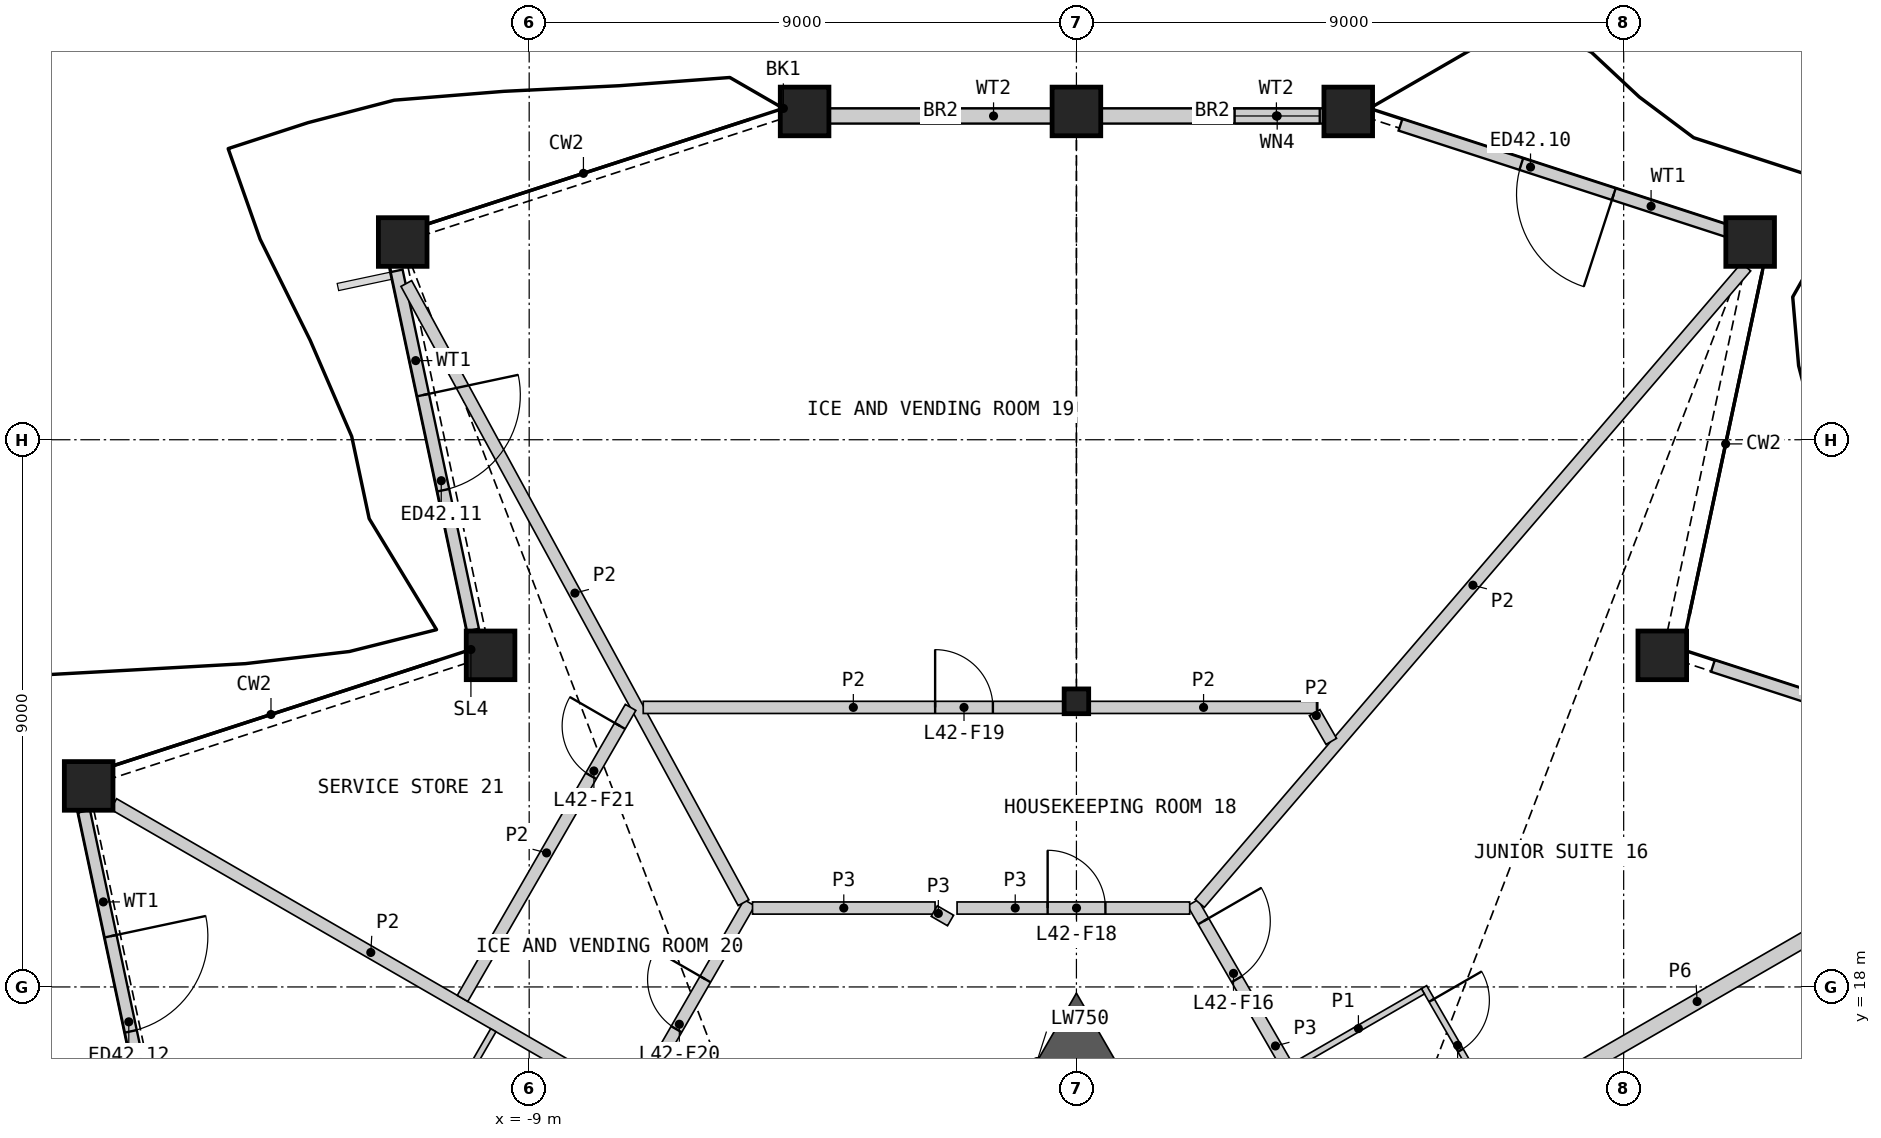
"""IFC4 building model, lengths in metres.
Left out: names, types, materials, properties, quantities, classifications, styles, units other than length and angle.
Written with IfcOpenShell. Run it as: python <this file> out.ifc"""

import sys

from ifc_helpers import new_model, si_unit, direction, frame, frame_2d, origin, origin_2d, place, context, subcontext, project, spatial, polyline, rectangle, hollow_rectangle, i_section, outline, extrude, element, fill, save


model = new_model("IFC4")
c1 = context("Model", 3, precision=1e-05, world=origin(), true_north=direction((0.0, 1.0)))
c2 = subcontext(c1, "Body", "Model", "MODEL_VIEW")
j1 = project(units=[si_unit("LENGTHUNIT", "METRE"), si_unit("PLANEANGLEUNIT", "RADIAN")], contexts=[c1])
p1 = place(None, origin())
s1 = spatial("IfcSite", under=j1, at=p1, CompositionType="ELEMENT")
p2 = place(p1, origin())
s2 = spatial("IfcBuilding", under=s1, at=p2, CompositionType="ELEMENT")
p3 = place(p2, frame((0.0, 0.0, 194.4)))
s3 = spatial("IfcBuildingStorey", under=s2, at=p3, CompositionType="ELEMENT", Elevation=194.4)
for number, where, z_axis, x_axis in (
    (1, (9.635, 23.454, 0.0), (0.0, 0.0, 1.0), (1.0, 0.0, 0.0)),
    (2, (11.08, 30.252, 0.0), (0.0, 0.0, 1.0), (1.0, 0.0, 0.0)),
    (3, (4.47, 32.399, 0.0), (0.0, 0.0, 1.0), (1.0, 0.0, 0.0)),
    (4, (0.0, 32.399, 0.0), (0.0, 0.0, 1.0), (1.0, 0.0, 0.0)),
    (5, (-4.47, 32.399, 0.0), (0.0, 0.0, 1.0), (1.0, 0.0, 0.0)),
    (6, (-11.08, 30.252, 0.0), (0.0, 0.0, 1.0), (1.0, 0.0, 0.0)),
    (7, (-9.635, 23.454, 0.0), (0.0, 0.0, 1.0), (1.0, 0.0, 0.0)),
    (8, (-16.245, 21.306, 0.0), (0.0, 0.0, 1.0), (1.0, 0.0, 0.0)),
):
    element("IfcColumn", number, at=place(p3, frame(where, z_axis=z_axis, x_axis=x_axis)), inside=s3, PredefinedType="COLUMN", context=c2, shape_type="SweptSolid", body=[
        extrude(hollow_rectangle(XDim=0.8, YDim=0.8, WallThickness=0.05, at=origin_2d()), origin(), (0.0, 0.0, 1.0), 3.6),
    ])
p4 = place(p3, frame((0.0, 22.698, 0.0), z_axis=(0.0, 0.0, 1.0), x_axis=(1.0, 0.0, 0.0)))
e9 = element("IfcColumn", 9, at=p4, inside=s3, PredefinedType="COLUMN", context=c2, shape_type="SweptSolid", body=[
    extrude(i_section(OverallWidth=0.404, OverallDepth=0.407, WebThickness=0.027, FlangeThickness=0.044, at=origin_2d()), origin(), (0.0, 0.0, 1.0), 3.6),
])
p5 = place(p3, frame((15.963, 21.493, 0.0), z_axis=(0.0, 0.0, 1.0), x_axis=(-0.951059834965, 0.309006780371, 0.0)))
e10 = element("IfcWall", 10, at=p5, inside=s3, PredefinedType="SOLIDWALL", context=c2, shape_type="SweptSolid", body=[
    extrude(rectangle(XDim=5.779, YDim=0.2, at=frame_2d((2.889, 0.0))), origin(), (0.0, 0.0, 1.0), 2.701),
])
p6 = place(p5, frame((2.089, 0.0, 0.0)))
e11 = element("IfcOpeningElement", 11, at=p6, cuts=e10, PredefinedType="OPENING", context=c2, shape_type="SweptSolid", body=[
    extrude(rectangle(XDim=1.6, YDim=2.4, at=frame_2d((0.8, 1.2))), frame((0.0, 0.11, 0.0), z_axis=(0.0, -1.0, 0.0), x_axis=(1.0, 0.0, 0.0)), (0.0, 0.0, 1.0), 0.22),
])
p7 = place(p3, frame((10.825, 30.394, 0.0), z_axis=(0.0, 0.0, 1.0), x_axis=(-0.9510558006, 0.30901919705, 0.0)))
e12 = element("IfcWall", 12, at=p7, inside=s3, PredefinedType="SOLIDWALL", context=c2, shape_type="SweptSolid", body=[
    extrude(rectangle(XDim=5.778, YDim=0.2, at=frame_2d((2.889, 0.0))), origin(), (0.0, 0.0, 1.0), 2.701),
])
p8 = place(p7, frame((2.089, 0.0, 0.0)))
e13 = element("IfcOpeningElement", 13, at=p8, cuts=e12, PredefinedType="OPENING", context=c2, shape_type="SweptSolid", body=[
    extrude(rectangle(XDim=1.6, YDim=2.4, at=frame_2d((0.8, 1.2))), frame((0.0, 0.11, 0.0), z_axis=(0.0, -1.0, 0.0), x_axis=(1.0, 0.0, 0.0)), (0.0, 0.0, 1.0), 0.22),
])
p9 = place(p3, frame((4.252, 32.325, 0.0), z_axis=(0.0, 0.0, 1.0), x_axis=(-1.0, 0.0, 0.0)))
e14 = element("IfcWall", 14, at=p9, inside=s3, PredefinedType="SOLIDWALL", context=c2, shape_type="SweptSolid", body=[
    extrude(rectangle(XDim=3.852, YDim=0.25, at=frame_2d((1.926, 0.0))), origin(), (0.0, 0.0, 1.0), 2.701),
])
p10 = place(p9, frame((0.25, 0.0, 0.4)))
e15 = element("IfcOpeningElement", 15, at=p10, cuts=e14, PredefinedType="OPENING", context=c2, shape_type="SweptSolid", body=[
    extrude(rectangle(XDim=1.4, YDim=0.7, at=frame_2d((0.7, 0.35))), frame((0.0, 0.135, 0.0), z_axis=(0.0, -1.0, 0.0), x_axis=(1.0, 0.0, 0.0)), (0.0, 0.0, 1.0), 0.27),
])
p11 = place(p3, frame((-0.4, 32.325, 0.0), z_axis=(0.0, 0.0, 1.0), x_axis=(-1.0, 0.0, 0.0)))
e16 = element("IfcWall", 16, at=p11, inside=s3, PredefinedType="SOLIDWALL", context=c2, shape_type="SweptSolid", body=[
    extrude(rectangle(XDim=3.852, YDim=0.25, at=frame_2d((1.926, 0.0))), origin(), (0.0, 0.0, 1.0), 2.701),
])
p12 = place(p3, frame((-11.18, 29.778, 0.0), z_axis=(0.0, 0.0, 1.0), x_axis=(0.207894531291, -0.978151247946, 0.0)))
e17 = element("IfcWall", 17, at=p12, inside=s3, PredefinedType="SOLIDWALL", context=c2, shape_type="SweptSolid", body=[
    extrude(rectangle(XDim=6.04, YDim=0.2, at=frame_2d((3.02, 0.0))), origin(), (0.0, 0.0, 1.0), 2.701),
])
p13 = place(p12, frame((2.089, 0.0, 0.0)))
e18 = element("IfcOpeningElement", 18, at=p13, cuts=e17, PredefinedType="OPENING", context=c2, shape_type="SweptSolid", body=[
    extrude(rectangle(XDim=1.6, YDim=2.4, at=frame_2d((0.8, 1.2))), frame((0.0, 0.11, 0.0), z_axis=(0.0, -1.0, 0.0), x_axis=(1.0, 0.0, 0.0)), (0.0, 0.0, 1.0), 0.22),
])
p14 = place(p3, frame((-16.321, 20.89, 0.0), z_axis=(0.0, 0.0, 1.0), x_axis=(0.207912864597, -0.978147351238, 0.0)))
e19 = element("IfcWall", 19, at=p14, inside=s3, PredefinedType="SOLIDWALL", context=c2, shape_type="SweptSolid", body=[
    extrude(rectangle(XDim=6.098, YDim=0.2, at=frame_2d((3.049, 0.0))), origin(), (0.0, 0.0, 1.0), 2.701),
])
p15 = place(p14, frame((2.101, 0.0, 0.0)))
e20 = element("IfcOpeningElement", 20, at=p15, cuts=e19, PredefinedType="OPENING", context=c2, shape_type="SweptSolid", body=[
    extrude(rectangle(XDim=1.6, YDim=2.4, at=frame_2d((0.8, 1.2))), frame((0.0, 0.11, 0.0), z_axis=(0.0, -1.0, 0.0), x_axis=(1.0, 0.0, 0.0)), (0.0, 0.0, 1.0), 0.22),
])
p16 = place(p3, origin())
e21 = element("IfcWall", 21, at=p16, inside=s3, PredefinedType="SHEAR", context=c2, shape_type="SweptSolid", body=[
    extrude(outline(polyline([(-0.649, 16.773), (0.0, 17.898), (0.649, 16.773), (0.0, 16.398), (-0.649, 16.773)])), origin(), (0.0, 0.0, 1.0), 3.25),
])
p17 = place(p3, frame((-19.476, -5.035, 0.0), z_axis=(0.0, 0.0, 1.0), x_axis=(0.500000757641, 0.86602496636, 0.0)))
e22 = element("IfcWall", 22, at=p17, inside=s3, PredefinedType="PARTITIONING", context=c2, shape_type="SweptSolid", body=[
    extrude(rectangle(XDim=28.198, YDim=0.2, at=frame_2d((14.099, 0.0))), origin(), (0.0, 0.0, 1.0), 3.25),
])
p18 = place(p17, frame((25.796, 0.0, 0.0)))
e23 = element("IfcOpeningElement", 23, at=p18, cuts=e22, PredefinedType="OPENING", context=c2, shape_type="SweptSolid", body=[
    extrude(rectangle(XDim=0.95, YDim=2.1, at=frame_2d((0.475, 1.05))), frame((0.0, 0.11, 0.0), z_axis=(0.0, -1.0, 0.0), x_axis=(1.0, 0.0, 0.0)), (0.0, 0.0, 1.0), 0.22),
])
p19 = place(p17, frame((14.603, 0.0, 0.0)))
e24 = element("IfcOpeningElement", 24, at=p19, cuts=e22, PredefinedType="OPENING", context=c2, shape_type="SweptSolid", body=[
    extrude(rectangle(XDim=1.1, YDim=2.1, at=frame_2d((0.55, 1.05))), frame((0.0, 0.11, 0.0), z_axis=(0.0, -1.0, 0.0), x_axis=(1.0, 0.0, 0.0)), (0.0, 0.0, 1.0), 0.22),
])
p20 = place(p17, frame((11.993, 0.0, 0.0)))
e25 = element("IfcOpeningElement", 25, at=p20, cuts=e22, PredefinedType="OPENING", context=c2, shape_type="SweptSolid", body=[
    extrude(rectangle(XDim=1.1, YDim=2.1, at=frame_2d((0.55, 1.05))), frame((0.0, 0.11, 0.0), z_axis=(0.0, -1.0, 0.0), x_axis=(1.0, 0.0, 0.0)), (0.0, 0.0, 1.0), 0.22),
])
p21 = place(p17, frame((1.452, 0.0, 0.0)))
e26 = element("IfcOpeningElement", 26, at=p21, cuts=e22, PredefinedType="OPENING", context=c2, shape_type="SweptSolid", body=[
    extrude(rectangle(XDim=0.95, YDim=2.1, at=frame_2d((0.475, 1.05))), frame((0.0, 0.11, 0.0), z_axis=(0.0, -1.0, 0.0), x_axis=(1.0, 0.0, 0.0)), (0.0, 0.0, 1.0), 0.22),
])
p22 = place(p3, frame((4.582, 14.512, 0.0), z_axis=(0.0, 0.0, 1.0), x_axis=(0.866027263711, 0.4999967785, 0.0)))
e27 = element("IfcWall", 27, at=p22, inside=s3, PredefinedType="PARTITIONING", context=c2, shape_type="SweptSolid", body=[
    extrude(rectangle(XDim=12.994, YDim=0.25, at=frame_2d((6.497, 0.0))), origin(), (0.0, 0.0, 1.0), 2.404),
])
p23 = place(p3, frame((1.913, 19.385, 0.0), z_axis=(0.0, 0.0, 1.0), x_axis=(0.499972435384, -0.866041317638, 0.0)))
e28 = element("IfcWall", 28, at=p23, inside=s3, PredefinedType="PARTITIONING", context=c2, shape_type="SweptSolid", body=[
    extrude(rectangle(XDim=5.439, YDim=0.2, at=frame_2d((2.719, 0.0))), origin(), (0.0, 0.0, 1.0), 3.25),
])
p24 = place(p23, frame((0.351, 0.0, 0.0)))
e29 = element("IfcOpeningElement", 29, at=p24, cuts=e28, PredefinedType="OPENING", context=c2, shape_type="SweptSolid", body=[
    extrude(rectangle(XDim=1.1, YDim=2.1, at=frame_2d((0.55, 1.05))), frame((0.0, 0.11, 0.0), z_axis=(0.0, -1.0, 0.0), x_axis=(1.0, 0.0, 0.0)), (0.0, 0.0, 1.0), 0.22),
])
p25 = place(p3, frame((-1.963, 19.298, 0.0), z_axis=(0.0, 0.0, 1.0), x_axis=(1.0, 0.0, 0.0)))
e30 = element("IfcWall", 30, at=p25, inside=s3, PredefinedType="PARTITIONING", context=c2, shape_type="SweptSolid", body=[
    extrude(rectangle(XDim=3.826, YDim=0.2, at=frame_2d((1.913, 0.0))), origin(), (0.0, 0.0, 1.0), 3.25),
])
p26 = place(p25, frame((1.49, 0.0, 0.0)))
e31 = element("IfcOpeningElement", 31, at=p26, cuts=e30, PredefinedType="OPENING", context=c2, shape_type="SweptSolid", body=[
    extrude(rectangle(XDim=0.95, YDim=2.1, at=frame_2d((0.475, 1.05))), frame((0.0, 0.11, 0.0), z_axis=(0.0, -1.0, 0.0), x_axis=(1.0, 0.0, 0.0)), (0.0, 0.0, 1.0), 0.22),
])
p27 = place(p3, frame((-5.327, 19.298, 0.0), z_axis=(0.0, 0.0, 1.0), x_axis=(1.0, 0.0, 0.0)))
e32 = element("IfcWall", 32, at=p27, inside=s3, PredefinedType="PARTITIONING", context=c2, shape_type="SweptSolid", body=[
    extrude(rectangle(XDim=3.002, YDim=0.2, at=frame_2d((1.501, 0.0))), origin(), (0.0, 0.0, 1.0), 3.25),
])
p28 = place(p3, frame((-2.338, 19.248, 0.0), z_axis=(0.0, 0.0, 1.0), x_axis=(0.866395311824, -0.499358752451, 0.0)))
e33 = element("IfcWall", 33, at=p28, inside=s3, PredefinedType="PARTITIONING", context=c2, shape_type="SweptSolid", body=[
    extrude(rectangle(XDim=0.31, YDim=0.2, at=frame_2d((0.155, 0.0))), origin(), (0.0, 0.0, 1.0), 3.25),
])
p29 = place(p3, frame((2.028, 19.374, 0.0), z_axis=(0.0, 0.0, 1.0), x_axis=(0.651304244859, 0.758816697647, 0.0)))
e34 = element("IfcWall", 34, at=p29, inside=s3, PredefinedType="PARTITIONING", context=c2, shape_type="SweptSolid", body=[
    extrude(rectangle(XDim=13.795, YDim=0.2, at=frame_2d((6.897, 0.0))), origin(), (0.0, 0.0, 1.0), 2.404),
])
p30 = place(p3, frame((-11.021, 29.57, 0.0), z_axis=(0.0, 0.0, 1.0), x_axis=(0.478233946204, -0.878232482147, 0.0)))
e35 = element("IfcWall", 35, at=p30, inside=s3, PredefinedType="PARTITIONING", context=c2, shape_type="SweptSolid", body=[
    extrude(rectangle(XDim=11.596, YDim=0.2, at=frame_2d((5.798, 0.0))), origin(), (0.0, 0.0, 1.0), 2.404),
])
p31 = place(p3, frame((-15.835, 21.009, 0.0), z_axis=(0.0, 0.0, 1.0), x_axis=(0.866024525919, -0.500001520505, 0.0)))
e36 = element("IfcWall", 36, at=p31, inside=s3, PredefinedType="PARTITIONING", context=c2, shape_type="SweptSolid", body=[
    extrude(rectangle(XDim=9.769, YDim=0.2, at=frame_2d((4.885, 0.0))), origin(), (0.0, 0.0, 1.0), 2.404),
])
p32 = place(p3, frame((-7.124, 22.598, 0.0), z_axis=(0.0, 0.0, 1.0), x_axis=(1.0, 0.0, 0.0)))
e37 = element("IfcWall", 37, at=p32, inside=s3, PredefinedType="PARTITIONING", context=c2, shape_type="SweptSolid", body=[
    extrude(rectangle(XDim=6.911, YDim=0.2, at=frame_2d((3.455, 0.0))), origin(), (0.0, 0.0, 1.0), 2.404),
])
p33 = place(p32, frame((4.801, 0.0, 0.0)))
e38 = element("IfcOpeningElement", 38, at=p33, cuts=e37, PredefinedType="OPENING", context=c2, shape_type="SweptSolid", body=[
    extrude(rectangle(XDim=0.95, YDim=2.1, at=frame_2d((0.475, 1.05))), frame((0.0, 0.11, 0.0), z_axis=(0.0, -1.0, 0.0), x_axis=(1.0, 0.0, 0.0)), (0.0, 0.0, 1.0), 0.22),
])
p34 = place(p3, frame((-10.096, 17.811, 0.0), z_axis=(0.0, 0.0, 1.0), x_axis=(0.500015590807, 0.866016402241, 0.0)))
e39 = element("IfcWall", 39, at=p34, inside=s3, PredefinedType="PARTITIONING", context=c2, shape_type="SweptSolid", body=[
    extrude(rectangle(XDim=5.527, YDim=0.2, at=frame_2d((2.764, 0.0))), origin(), (0.0, 0.0, 1.0), 2.404),
])
p35 = place(p34, frame((4.225, 0.0, 0.0)))
e40 = element("IfcOpeningElement", 40, at=p35, cuts=e39, PredefinedType="OPENING", context=c2, shape_type="SweptSolid", body=[
    extrude(rectangle(XDim=0.95, YDim=2.1, at=frame_2d((0.475, 1.05))), frame((0.0, 0.11, 0.0), z_axis=(0.0, -1.0, 0.0), x_axis=(1.0, 0.0, 0.0)), (0.0, 0.0, 1.0), 0.22),
])
p36 = place(p3, frame((0.214, 22.598, 0.0), z_axis=(0.0, 0.0, 1.0), x_axis=(1.0, 0.0, 0.0)))
e41 = element("IfcWall", 41, at=p36, inside=s3, PredefinedType="PARTITIONING", context=c2, shape_type="SweptSolid", body=[
    extrude(rectangle(XDim=3.755, YDim=0.2, at=frame_2d((1.877, 0.0))), origin(), (0.0, 0.0, 1.0), 2.404),
])
p37 = place(p3, frame((3.918, 22.511, 0.0), z_axis=(0.0, 0.0, 1.0), x_axis=(0.500083826171, -0.865977001312, 0.0)))
e42 = element("IfcWall", 42, at=p37, inside=s3, PredefinedType="PARTITIONING", context=c2, shape_type="SweptSolid", body=[
    extrude(rectangle(XDim=0.546, YDim=0.2, at=frame_2d((0.273, 0.0))), origin(), (0.0, 0.0, 1.0), 2.404),
])
p38 = place(p3, frame((5.717, 17.996, 0.0), z_axis=(0.0, 0.0, 1.0), x_axis=(0.500027264788, -0.866009661879, 0.0)))
e43 = element("IfcWall", 43, at=p38, inside=s3, PredefinedType="PARTITIONING", context=c2, shape_type="SweptSolid", body=[
    extrude(rectangle(XDim=5.2, YDim=0.1, at=frame_2d((2.6, 0.0))), origin(), (0.0, 0.0, 1.0), 2.404),
])
p39 = place(p38, frame((4.0, 0.0, 0.0)))
e44 = element("IfcOpeningElement", 44, at=p39, cuts=e43, PredefinedType="OPENING", context=c2, shape_type="SweptSolid", body=[
    extrude(rectangle(XDim=0.95, YDim=2.1, at=frame_2d((0.475, 1.05))), frame((0.0, 0.06, 0.0), z_axis=(0.0, -1.0, 0.0), x_axis=(1.0, 0.0, 0.0)), (0.0, 0.0, 1.0), 0.12),
])
p40 = place(p38, frame((0.25, 0.0, 0.0)))
e45 = element("IfcOpeningElement", 45, at=p40, cuts=e43, PredefinedType="OPENING", context=c2, shape_type="SweptSolid", body=[
    extrude(rectangle(XDim=0.95, YDim=2.1, at=frame_2d((0.475, 1.05))), frame((0.0, 0.06, 0.0), z_axis=(0.0, -1.0, 0.0), x_axis=(1.0, 0.0, 0.0)), (0.0, 0.0, 1.0), 0.12),
])
p41 = place(p3, frame((-11.065, 14.733, 0.0), z_axis=(0.0, 0.0, 1.0), x_axis=(0.500037662692, 0.866003658127, 0.0)))
e46 = element("IfcWall", 46, at=p41, inside=s3, PredefinedType="PARTITIONING", context=c2, shape_type="SweptSolid", body=[
    extrude(rectangle(XDim=2.95, YDim=0.1, at=frame_2d((1.475, 0.0))), origin(), (0.0, 0.0, 1.0), 2.404),
])
p42 = place(p41, frame((0.25, 0.0, 0.0)))
e47 = element("IfcOpeningElement", 47, at=p42, cuts=e46, PredefinedType="OPENING", context=c2, shape_type="SweptSolid", body=[
    extrude(rectangle(XDim=0.95, YDim=2.1, at=frame_2d((0.475, 1.05))), frame((0.0, 0.06, 0.0), z_axis=(0.0, -1.0, 0.0), x_axis=(1.0, 0.0, 0.0)), (0.0, 0.0, 1.0), 0.12),
])
p43 = place(p3, frame((3.576, 16.703, 0.0), z_axis=(0.0, 0.0, 1.0), x_axis=(0.866057815567, 0.499943856944, 0.0)))
e48 = element("IfcWall", 48, at=p43, inside=s3, PredefinedType="PARTITIONING", context=c2, shape_type="SweptSolid", body=[
    extrude(rectangle(XDim=2.45, YDim=0.1, at=frame_2d((1.225, 0.0))), origin(), (0.0, 0.0, 1.0), 2.404),
])
p44 = place(p8, origin())
e49 = element("IfcDoor", 49, at=p44, inside=s3, OperationType="DOUBLE_DOOR_SINGLE_SWING", PredefinedType="DOOR", context=c2, shape_type="SweptSolid", body=[
    extrude(rectangle(XDim=1.6, YDim=2.4, at=frame_2d((0.8, 1.2))), frame((0.0, 0.025, 0.0), z_axis=(0.0, -1.0, 0.0), x_axis=(1.0, 0.0, 0.0)), (0.0, 0.0, 1.0), 0.05),
])
fill(e13, e49)
p45 = place(p10, origin())
e50 = element("IfcWindow", 50, at=p45, inside=s3, PartitioningType="SINGLE_PANEL", PredefinedType="WINDOW", context=c2, shape_type="SweptSolid", body=[
    extrude(rectangle(XDim=1.4, YDim=0.7, at=frame_2d((0.7, 0.35))), frame((0.0, 0.03, 0.0), z_axis=(0.0, -1.0, 0.0), x_axis=(1.0, 0.0, 0.0)), (0.0, 0.0, 1.0), 0.06),
])
fill(e15, e50)
p46 = place(p13, origin())
e51 = element("IfcDoor", 51, at=p46, inside=s3, OperationType="DOUBLE_DOOR_SINGLE_SWING", PredefinedType="DOOR", context=c2, shape_type="SweptSolid", body=[
    extrude(rectangle(XDim=1.6, YDim=2.4, at=frame_2d((0.8, 1.2))), frame((0.0, 0.025, 0.0), z_axis=(0.0, -1.0, 0.0), x_axis=(1.0, 0.0, 0.0)), (0.0, 0.0, 1.0), 0.05),
])
fill(e18, e51)
p47 = place(p15, origin())
e52 = element("IfcDoor", 52, at=p47, inside=s3, OperationType="DOUBLE_DOOR_SINGLE_SWING", PredefinedType="DOOR", context=c2, shape_type="SweptSolid", body=[
    extrude(rectangle(XDim=1.6, YDim=2.4, at=frame_2d((0.8, 1.2))), frame((0.0, 0.025, 0.0), z_axis=(0.0, -1.0, 0.0), x_axis=(1.0, 0.0, 0.0)), (0.0, 0.0, 1.0), 0.05),
])
fill(e20, e52)
p48 = place(p24, origin())
e53 = element("IfcDoor", 53, at=p48, inside=s3, OperationType="SINGLE_SWING_LEFT", PredefinedType="DOOR", context=c2, shape_type="SweptSolid", body=[
    extrude(rectangle(XDim=1.1, YDim=2.1, at=frame_2d((0.55, 1.05))), frame((0.0, 0.025, 0.0), z_axis=(0.0, -1.0, 0.0), x_axis=(1.0, 0.0, 0.0)), (0.0, 0.0, 1.0), 0.05),
])
fill(e29, e53)
p49 = place(p40, origin())
e54 = element("IfcDoor", 54, at=p49, inside=s3, OperationType="SINGLE_SWING_LEFT", PredefinedType="DOOR", context=c2, shape_type="SweptSolid", body=[
    extrude(rectangle(XDim=0.95, YDim=2.1, at=frame_2d((0.475, 1.05))), frame((0.0, 0.025, 0.0), z_axis=(0.0, -1.0, 0.0), x_axis=(1.0, 0.0, 0.0)), (0.0, 0.0, 1.0), 0.05),
])
fill(e45, e54)
p50 = place(p26, origin())
e55 = element("IfcDoor", 55, at=p50, inside=s3, OperationType="SINGLE_SWING_LEFT", PredefinedType="DOOR", context=c2, shape_type="SweptSolid", body=[
    extrude(rectangle(XDim=0.95, YDim=2.1, at=frame_2d((0.475, 1.05))), frame((0.0, 0.025, 0.0), z_axis=(0.0, -1.0, 0.0), x_axis=(1.0, 0.0, 0.0)), (0.0, 0.0, 1.0), 0.05),
])
fill(e31, e55)
p51 = place(p33, origin())
e56 = element("IfcDoor", 56, at=p51, inside=s3, OperationType="SINGLE_SWING_LEFT", PredefinedType="DOOR", context=c2, shape_type="SweptSolid", body=[
    extrude(rectangle(XDim=0.95, YDim=2.1, at=frame_2d((0.475, 1.05))), frame((0.0, 0.025, 0.0), z_axis=(0.0, -1.0, 0.0), x_axis=(1.0, 0.0, 0.0)), (0.0, 0.0, 1.0), 0.05),
])
fill(e38, e56)
p52 = place(p18, origin())
e57 = element("IfcDoor", 57, at=p52, inside=s3, OperationType="SINGLE_SWING_RIGHT", PredefinedType="DOOR", context=c2, shape_type="SweptSolid", body=[
    extrude(rectangle(XDim=0.95, YDim=2.1, at=frame_2d((0.475, 1.05))), frame((0.0, 0.025, 0.0), z_axis=(0.0, -1.0, 0.0), x_axis=(1.0, 0.0, 0.0)), (0.0, 0.0, 1.0), 0.05),
])
fill(e23, e57)
p53 = place(p35, origin())
e58 = element("IfcDoor", 58, at=p53, inside=s3, OperationType="SINGLE_SWING_RIGHT", PredefinedType="DOOR", context=c2, shape_type="SweptSolid", body=[
    extrude(rectangle(XDim=0.95, YDim=2.1, at=frame_2d((0.475, 1.05))), frame((0.0, 0.025, 0.0), z_axis=(0.0, -1.0, 0.0), x_axis=(1.0, 0.0, 0.0)), (0.0, 0.0, 1.0), 0.05),
])
fill(e40, e58)
save(model, sys.argv[1])
